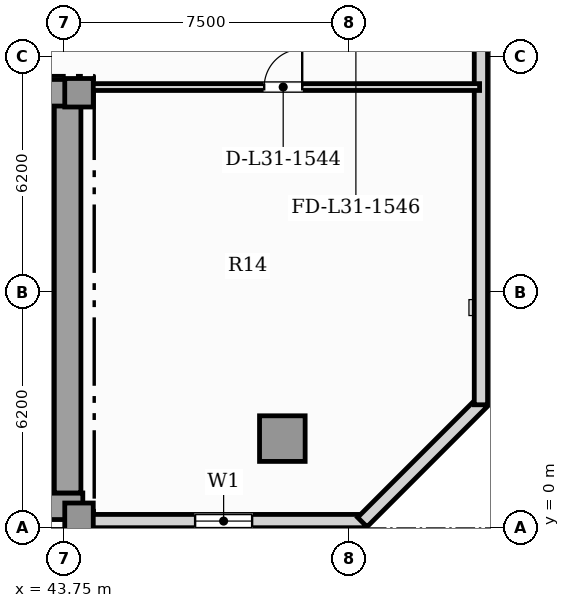
"""IFC4 building model, lengths in metres.
Left out: names, types, materials, properties, quantities, classifications, styles, units other than length and angle.
Written with IfcOpenShell. Run it as: python <this file> out.ifc"""

import sys

from ifc_helpers import new_model, si_unit, direction, frame, frame_2d, origin, origin_2d, place, context, subcontext, project, spatial, rectangle, hollow_rectangle, extrude, element, fill, save


model = new_model("IFC4")
c1 = context("Model", 3, precision=1e-05, world=origin(), true_north=direction((0.0, 1.0)))
c2 = subcontext(c1, "Body", "Model", "MODEL_VIEW")
j1 = project(units=[si_unit("LENGTHUNIT", "METRE"), si_unit("PLANEANGLEUNIT", "RADIAN")], contexts=[c1])
p1 = place(None, origin())
s1 = spatial("IfcSite", under=j1, at=p1, CompositionType="ELEMENT")
p2 = place(p1, origin())
s2 = spatial("IfcBuilding", under=s1, at=p2, CompositionType="ELEMENT")
p3 = place(p2, frame((0.0, 0.0, 127.25)))
s3 = spatial("IfcBuildingStorey", under=s2, at=p3, CompositionType="ELEMENT", Elevation=127.25)
p4 = place(p3, frame((13.25, 0.57, 0.0), z_axis=(0.0, 0.0, 1.0), x_axis=(1.0, 0.0, 0.0)))
e1 = element("IfcWall", 1, at=p4, inside=s3, PredefinedType="SHEAR", context=c2, shape_type="SweptSolid", body=[
    extrude(rectangle(XDim=31.0, YDim=0.7, at=frame_2d((15.5, 0.0))), origin(), (0.0, 0.0, 1.0), 3.6),
])
p5 = place(p3, frame((43.85, 0.92, 0.0), z_axis=(0.0, 0.0, 1.0), x_axis=(0.0, 1.0, 0.0)))
e2 = element("IfcWall", 2, at=p5, inside=s3, PredefinedType="SHEAR", context=c2, shape_type="SweptSolid", body=[
    extrude(rectangle(XDim=10.53, YDim=0.7, at=frame_2d((5.265, 0.0))), origin(), (0.0, 0.0, 1.0), 3.6),
])
p6 = place(p3, frame((41.3, 11.45, 0.0), z_axis=(0.0, 0.0, 1.0), x_axis=(1.0, 0.0, 0.0)))
e3 = element("IfcWall", 3, at=p6, inside=s3, PredefinedType="SHEAR", context=c2, shape_type="SweptSolid", body=[
    extrude(rectangle(XDim=2.95, YDim=0.7, at=frame_2d((1.475, 0.0))), origin(), (0.0, 0.0, 1.0), 3.6),
])
for number, where, z_axis, x_axis in (
    (4, (44.15, 0.28, 0.0), (0.0, 0.0, 1.0), (1.0, 0.0, 0.0)),
    (5, (44.15, 11.45, 0.0), (0.0, 0.0, 1.0), (1.0, 0.0, 0.0)),
):
    element("IfcColumn", number, at=place(p3, frame(where, z_axis=z_axis, x_axis=x_axis)), inside=s3, PredefinedType="COLUMN", context=c2, shape_type="SweptSolid", body=[
        extrude(rectangle(XDim=0.75, YDim=0.75, at=origin_2d()), origin(), (0.0, 0.0, 1.0), 3.85),
    ])
p7 = place(p3, frame((49.5, 2.35, 0.0), z_axis=(0.0, 0.0, 1.0), x_axis=(1.0, 0.0, 0.0)))
e6 = element("IfcColumn", 6, at=p7, inside=s3, PredefinedType="USERDEFINED", context=c2, shape_type="SweptSolid", body=[
    extrude(hollow_rectangle(XDim=1.2, YDim=1.2, WallThickness=0.07, at=origin_2d()), origin(), (0.0, 0.0, 1.0), 3.85),
])
p8 = place(p3, frame((44.25, 0.18, 0.0), z_axis=(0.0, 0.0, 1.0), x_axis=(1.0, 0.0, 0.0)))
e7 = element("IfcWall", 7, at=p8, inside=s3, PredefinedType="SOLIDWALL", context=c2, shape_type="SweptSolid", body=[
    extrude(rectangle(XDim=7.41, YDim=0.35, at=frame_2d((3.705, 0.0))), origin(), (0.0, 0.0, 1.0), 3.6),
])
p9 = place(p8, frame((2.955, 0.0, 0.9)))
e8 = element("IfcOpeningElement", 8, at=p9, cuts=e7, PredefinedType="OPENING", context=c2, shape_type="SweptSolid", body=[
    extrude(rectangle(XDim=1.5, YDim=1.95, at=frame_2d((0.75, 0.975))), frame((0.0, 0.185, 0.0), z_axis=(0.0, -1.0, 0.0), x_axis=(1.0, 0.0, 0.0)), (0.0, 0.0, 1.0), 0.37),
])
p10 = place(p3, frame((51.604, 0.152, 0.0), z_axis=(0.0, 0.0, 1.0), x_axis=(0.707134240044, 0.707079321262, 0.0)))
e9 = element("IfcWall", 9, at=p10, inside=s3, PredefinedType="SOLIDWALL", context=c2, shape_type="SweptSolid", body=[
    extrude(rectangle(XDim=4.446, YDim=0.35, at=frame_2d((2.223, 0.0))), origin(), (0.0, 0.0, 1.0), 3.6),
])
p11 = place(p3, frame((54.725, 3.24, 0.0), z_axis=(0.0, 0.0, 1.0), x_axis=(0.0, 1.0, 0.0)))
e10 = element("IfcWall", 10, at=p11, inside=s3, PredefinedType="SOLIDWALL", context=c2, shape_type="SweptSolid", body=[
    extrude(rectangle(XDim=36.72, YDim=0.35, at=frame_2d((18.36, 0.0))), origin(), (0.0, 0.0, 1.0), 3.6),
])
p12 = place(p11, frame((30.56, 0.0, 0.95)))
e11 = element("IfcOpeningElement", 11, at=p12, cuts=e10, PredefinedType="OPENING", context=c2, shape_type="SweptSolid", body=[
    extrude(rectangle(XDim=0.9, YDim=1.5, at=frame_2d((0.45, 0.75))), frame((0.0, 0.185, 0.0), z_axis=(0.0, -1.0, 0.0), x_axis=(1.0, 0.0, 0.0)), (0.0, 0.0, 1.0), 0.37),
])
p13 = place(p11, frame((12.83, 0.0, 0.9)))
e12 = element("IfcOpeningElement", 12, at=p13, cuts=e10, PredefinedType="OPENING", context=c2, shape_type="SweptSolid", body=[
    extrude(rectangle(XDim=1.5, YDim=1.95, at=frame_2d((0.75, 0.975))), frame((0.0, 0.185, 0.0), z_axis=(0.0, -1.0, 0.0), x_axis=(1.0, 0.0, 0.0)), (0.0, 0.0, 1.0), 0.37),
])
p14 = place(p11, frame((32.823, 0.0, 0.9)))
e13 = element("IfcOpeningElement", 13, at=p14, cuts=e10, PredefinedType="OPENING", context=c2, shape_type="SweptSolid", body=[
    extrude(rectangle(XDim=1.5, YDim=1.95, at=frame_2d((0.75, 0.975))), frame((0.0, 0.185, 0.0), z_axis=(0.0, -1.0, 0.0), x_axis=(1.0, 0.0, 0.0)), (0.0, 0.0, 1.0), 0.37),
])
p15 = place(p3, frame((40.06, 8.52, 0.0), z_axis=(0.0, 0.0, 1.0), x_axis=(1.0, 0.0, 0.0)))
e14 = element("IfcWall", 14, at=p15, inside=s3, PredefinedType="SOLIDWALL", context=c2, shape_type="SweptSolid", body=[
    extrude(rectangle(XDim=3.4, YDim=0.22, at=frame_2d((1.7, 0.0))), origin(), (0.0, 0.0, 1.0), 3.6),
])
p16 = place(p15, frame((1.125, 0.0, 0.0)))
e15 = element("IfcOpeningElement", 15, at=p16, cuts=e14, PredefinedType="OPENING", context=c2, shape_type="SweptSolid", body=[
    extrude(rectangle(XDim=1.15, YDim=2.2, at=frame_2d((0.575, 1.1))), frame((0.0, 0.12, 0.0), z_axis=(0.0, -1.0, 0.0), x_axis=(1.0, 0.0, 0.0)), (0.0, 0.0, 1.0), 0.24),
])
p17 = place(p3, frame((44.355, 11.6, 0.0), z_axis=(0.0, 0.0, 1.0), x_axis=(1.0, 0.0, 0.0)))
e16 = element("IfcWall", 16, at=p17, inside=s3, PredefinedType="PARTITIONING", context=c2, shape_type="SweptSolid", body=[
    extrude(rectangle(XDim=10.335, YDim=0.18, at=frame_2d((5.167, 0.0))), origin(), (0.0, 0.0, 1.0), 3.6),
])
p18 = place(p17, frame((4.667, 0.0, 0.0)))
e17 = element("IfcOpeningElement", 17, at=p18, cuts=e16, PredefinedType="OPENING", context=c2, shape_type="SweptSolid", body=[
    extrude(rectangle(XDim=1.0, YDim=2.15, at=frame_2d((0.5, 1.075))), frame((0.0, 0.1, 0.0), z_axis=(0.0, -1.0, 0.0), x_axis=(1.0, 0.0, 0.0)), (0.0, 0.0, 1.0), 0.2),
])
p19 = place(p9, origin())
e18 = element("IfcWindow", 18, at=p19, inside=s3, PartitioningType="SINGLE_PANEL", PredefinedType="WINDOW", context=c2, shape_type="SweptSolid", body=[
    extrude(rectangle(XDim=1.5, YDim=1.95, at=frame_2d((0.75, 0.975))), frame((0.0, 0.03, 0.0), z_axis=(0.0, -1.0, 0.0), x_axis=(1.0, 0.0, 0.0)), (0.0, 0.0, 1.0), 0.06),
])
fill(e8, e18)
p20 = place(p18, origin())
e19 = element("IfcDoor", 19, at=p20, inside=s3, OperationType="SINGLE_SWING_RIGHT", PredefinedType="DOOR", context=c2, shape_type="SweptSolid", body=[
    extrude(rectangle(XDim=1.0, YDim=2.15, at=frame_2d((0.5, 1.075))), frame((0.0, 0.025, 0.0), z_axis=(0.0, -1.0, 0.0), x_axis=(1.0, 0.0, 0.0)), (0.0, 0.0, 1.0), 0.05),
])
fill(e17, e19)
save(model, sys.argv[1])
